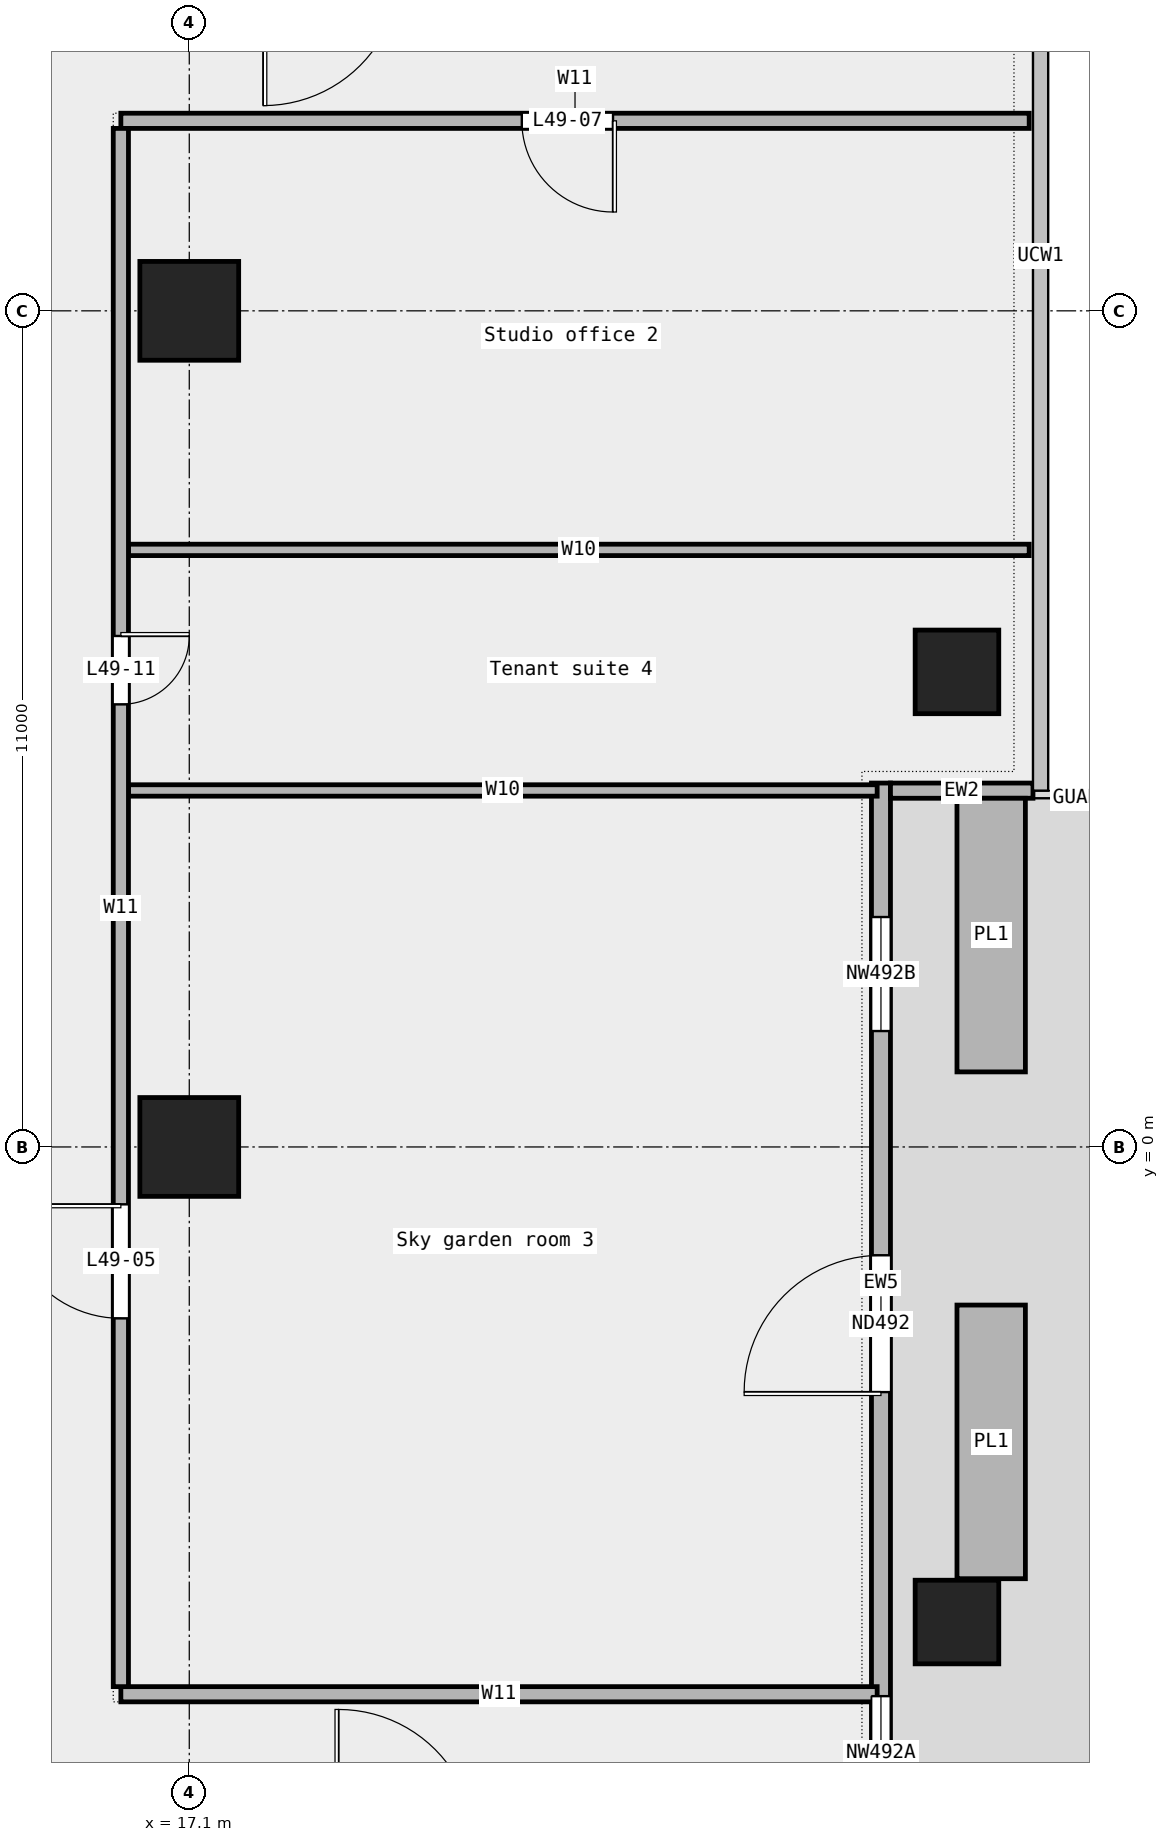
"""IFC4 building model, lengths in metres.
Left out: names, types, materials, properties, quantities, classifications, styles, units other than length and angle.
Written with IfcOpenShell. Run it as: python <this file> out.ifc"""

import sys

from ifc_helpers import new_model, si_unit, direction, frame, frame_2d, origin, origin_2d, place, context, subcontext, project, spatial, rectangle, extrude, element, fill, save


model = new_model("IFC4")
c1 = context("Model", 3, precision=1e-05, world=origin(), true_north=direction((0.0, 1.0)))
c2 = subcontext(c1, "Body", "Model", "MODEL_VIEW")
j1 = project(units=[si_unit("LENGTHUNIT", "METRE"), si_unit("PLANEANGLEUNIT", "RADIAN")], contexts=[c1])
p1 = place(None, origin())
s1 = spatial("IfcSite", under=j1, at=p1, CompositionType="ELEMENT")
p2 = place(p1, origin())
s2 = spatial("IfcBuilding", under=s1, at=p2, CompositionType="ELEMENT")
p3 = place(p2, frame((0.0, 0.0, 231.0)))
s3 = spatial("IfcBuildingStorey", under=s2, at=p3, CompositionType="ELEMENT", Elevation=231.0)
for number, where, z_axis, x_axis in (
    (1, (27.2, -6.25, 0.0), (0.0, 0.0, 1.0), (1.0, 0.0, 0.0)),
    (2, (27.2, 6.25, 0.0), (0.0, 0.0, 1.0), (1.0, 0.0, 0.0)),
):
    element("IfcColumn", number, at=place(p3, frame(where, z_axis=z_axis, x_axis=x_axis)), inside=s3, PredefinedType="COLUMN", context=c2, shape_type="SweptSolid", body=[
        extrude(rectangle(XDim=1.1, YDim=1.1, at=origin_2d()), origin(), (0.0, 0.0, 1.0), 3.6),
    ])
for number, where, z_axis, x_axis in (
    (3, (17.1, 0.0, 0.0), (0.0, 0.0, 1.0), (1.0, 0.0, 0.0)),
    (4, (17.1, 11.0, 0.0), (0.0, 0.0, 1.0), (1.0, 0.0, 0.0)),
):
    element("IfcColumn", number, at=place(p3, frame(where, z_axis=z_axis, x_axis=x_axis)), inside=s3, PredefinedType="COLUMN", context=c2, shape_type="SweptSolid", body=[
        extrude(rectangle(XDim=1.3, YDim=1.3, at=origin_2d()), origin(), (0.0, 0.0, 1.0), 3.6),
    ])
p4 = place(p3, frame((26.2, -9.475, 0.0), z_axis=(0.0, 0.0, 1.0), x_axis=(0.0, 1.0, 0.0)))
e5 = element("IfcWall", 5, at=p4, inside=s3, PredefinedType="STANDARD", context=c2, shape_type="SweptSolid", body=[
    extrude(rectangle(XDim=14.263, YDim=0.25, at=frame_2d((7.131, 0.0))), origin(), (0.0, 0.0, 1.0), 3.6),
])
p5 = place(p4, frame((0.75, 0.0, 0.45)))
e6 = element("IfcOpeningElement", 6, at=p5, cuts=e5, PredefinedType="OPENING", context=c2, shape_type="SweptSolid", body=[
    extrude(rectangle(XDim=1.5, YDim=2.4, at=frame_2d((0.75, 1.2))), frame((0.0, 0.137, 0.0), z_axis=(0.0, -1.0, 0.0), x_axis=(1.0, 0.0, 0.0)), (0.0, 0.0, 1.0), 0.274),
])
p6 = place(p4, frame((6.25, 0.0, 0.0)))
e7 = element("IfcOpeningElement", 7, at=p6, cuts=e5, PredefinedType="OPENING", context=c2, shape_type="SweptSolid", body=[
    extrude(rectangle(XDim=1.8, YDim=2.4, at=frame_2d((0.9, 1.2))), frame((0.0, 0.137, 0.0), z_axis=(0.0, -1.0, 0.0), x_axis=(1.0, 0.0, 0.0)), (0.0, 0.0, 1.0), 0.274),
])
p7 = place(p4, frame((11.0, 0.0, 0.45)))
e8 = element("IfcOpeningElement", 8, at=p7, cuts=e5, PredefinedType="OPENING", context=c2, shape_type="SweptSolid", body=[
    extrude(rectangle(XDim=1.5, YDim=2.4, at=frame_2d((0.75, 1.2))), frame((0.0, 0.137, 0.0), z_axis=(0.0, -1.0, 0.0), x_axis=(1.0, 0.0, 0.0)), (0.0, 0.0, 1.0), 0.274),
])
p8 = place(p3, frame((28.2, 4.688, 0.0), z_axis=(0.0, 0.0, 1.0), x_axis=(-1.0, 0.0, 0.0)))
e9 = element("IfcWall", 9, at=p8, inside=s3, PredefinedType="STANDARD", context=c2, shape_type="SweptSolid", body=[
    extrude(rectangle(XDim=1.875, YDim=0.2, at=frame_2d((0.938, 0.0))), origin(), (0.0, 0.0, 1.0), 3.6),
])
for number, where, z_axis, x_axis in (
    (10, (27.65, -5.68, 0.0), (0.0, 0.0, 1.0), (0.0, 1.0, 0.0)),
    (11, (27.65, 0.988, 0.0), (0.0, 0.0, 1.0), (0.0, 1.0, 0.0)),
):
    element("IfcWall", number, at=place(p3, frame(where, z_axis=z_axis, x_axis=x_axis)), inside=s3, PredefinedType="STANDARD", context=c2, shape_type="SweptSolid", body=[
        extrude(rectangle(XDim=3.6, YDim=0.9, at=frame_2d((1.8, 0.0))), origin(), (0.0, 0.0, 1.0), 0.7),
    ])
p9 = place(p3, frame((16.2, -7.2, 0.0), z_axis=(0.0, 0.0, 1.0), x_axis=(1.0, 0.0, 0.0)))
e12 = element("IfcWall", 12, at=p9, inside=s3, PredefinedType="PARTITIONING", context=c2, shape_type="SweptSolid", body=[
    extrude(rectangle(XDim=9.95, YDim=0.2, at=frame_2d((4.975, 0.0))), origin(), (0.0, 0.0, 1.0), 3.6),
])
p10 = place(p3, frame((16.3, 4.69, 0.0), z_axis=(0.0, 0.0, 1.0), x_axis=(1.0, 0.0, 0.0)))
e13 = element("IfcWall", 13, at=p10, inside=s3, PredefinedType="PARTITIONING", context=c2, shape_type="SweptSolid", body=[
    extrude(rectangle(XDim=9.85, YDim=0.15, at=frame_2d((4.925, 0.0))), origin(), (0.0, 0.0, 1.0), 3.6),
])
p11 = place(p3, frame((16.3, 7.855, 0.0), z_axis=(0.0, 0.0, 1.0), x_axis=(1.0, 0.0, 0.0)))
e14 = element("IfcWall", 14, at=p11, inside=s3, PredefinedType="PARTITIONING", context=c2, shape_type="SweptSolid", body=[
    extrude(rectangle(XDim=11.85, YDim=0.15, at=frame_2d((5.925, 0.0))), origin(), (0.0, 0.0, 1.0), 3.6),
])
p12 = place(p3, frame((16.2, 13.5, 0.0), z_axis=(0.0, 0.0, 1.0), x_axis=(1.0, 0.0, 0.0)))
e15 = element("IfcWall", 15, at=p12, inside=s3, PredefinedType="PARTITIONING", context=c2, shape_type="SweptSolid", body=[
    extrude(rectangle(XDim=11.95, YDim=0.2, at=frame_2d((5.975, 0.0))), origin(), (0.0, 0.0, 1.0), 3.6),
])
p13 = place(p12, frame((5.275, 0.0, 0.0)))
e16 = element("IfcOpeningElement", 16, at=p13, cuts=e15, PredefinedType="OPENING", context=c2, shape_type="SweptSolid", body=[
    extrude(rectangle(XDim=1.2, YDim=2.1, at=frame_2d((0.6, 1.05))), frame((0.0, 0.112, 0.0), z_axis=(0.0, -1.0, 0.0), x_axis=(1.0, 0.0, 0.0)), (0.0, 0.0, 1.0), 0.224),
])
p14 = place(p3, frame((16.2, -7.1, 0.0), z_axis=(0.0, 0.0, 1.0), x_axis=(0.0, 1.0, 0.0)))
e17 = element("IfcWall", 17, at=p14, inside=s3, PredefinedType="PARTITIONING", context=c2, shape_type="SweptSolid", body=[
    extrude(rectangle(XDim=20.5, YDim=0.2, at=frame_2d((10.25, 0.0))), origin(), (0.0, 0.0, 1.0), 3.6),
])
p15 = place(p14, frame((4.845, 0.0, 0.0)))
e18 = element("IfcOpeningElement", 18, at=p15, cuts=e17, PredefinedType="OPENING", context=c2, shape_type="SweptSolid", body=[
    extrude(rectangle(XDim=1.5, YDim=2.1, at=frame_2d((0.75, 1.05))), frame((0.0, 0.112, 0.0), z_axis=(0.0, -1.0, 0.0), x_axis=(1.0, 0.0, 0.0)), (0.0, 0.0, 1.0), 0.224),
])
p16 = place(p14, frame((12.923, 0.0, 0.0)))
e19 = element("IfcOpeningElement", 19, at=p16, cuts=e17, PredefinedType="OPENING", context=c2, shape_type="SweptSolid", body=[
    extrude(rectangle(XDim=0.9, YDim=2.1, at=frame_2d((0.45, 1.05))), frame((0.0, 0.112, 0.0), z_axis=(0.0, -1.0, 0.0), x_axis=(1.0, 0.0, 0.0)), (0.0, 0.0, 1.0), 0.224),
])
p17 = place(p5, origin())
e20 = element("IfcWindow", 20, at=p17, inside=s3, PartitioningType="SINGLE_PANEL", PredefinedType="WINDOW", context=c2, shape_type="SweptSolid", body=[
    extrude(rectangle(XDim=1.5, YDim=2.4, at=frame_2d((0.75, 1.2))), frame((0.0, 0.03, 0.0), z_axis=(0.0, -1.0, 0.0), x_axis=(1.0, 0.0, 0.0)), (0.0, 0.0, 1.0), 0.06),
])
fill(e6, e20)
p18 = place(p6, origin())
e21 = element("IfcDoor", 21, at=p18, inside=s3, OperationType="DOUBLE_DOOR_SINGLE_SWING", PredefinedType="DOOR", context=c2, shape_type="SweptSolid", body=[
    extrude(rectangle(XDim=1.8, YDim=2.4, at=frame_2d((0.9, 1.2))), frame((0.0, 0.025, 0.0), z_axis=(0.0, -1.0, 0.0), x_axis=(1.0, 0.0, 0.0)), (0.0, 0.0, 1.0), 0.05),
])
fill(e7, e21)
p19 = place(p7, origin())
e22 = element("IfcWindow", 22, at=p19, inside=s3, PartitioningType="SINGLE_PANEL", PredefinedType="WINDOW", context=c2, shape_type="SweptSolid", body=[
    extrude(rectangle(XDim=1.5, YDim=2.4, at=frame_2d((0.75, 1.2))), frame((0.0, 0.03, 0.0), z_axis=(0.0, -1.0, 0.0), x_axis=(1.0, 0.0, 0.0)), (0.0, 0.0, 1.0), 0.06),
])
fill(e8, e22)
p20 = place(p15, origin())
e23 = element("IfcDoor", 23, at=p20, inside=s3, OperationType="DOUBLE_DOOR_SINGLE_SWING", PredefinedType="DOOR", context=c2, shape_type="SweptSolid", body=[
    extrude(rectangle(XDim=1.5, YDim=2.1, at=frame_2d((0.75, 1.05))), frame((0.0, 0.025, 0.0), z_axis=(0.0, -1.0, 0.0), x_axis=(1.0, 0.0, 0.0)), (0.0, 0.0, 1.0), 0.05),
])
fill(e18, e23)
p21 = place(p13, origin())
e24 = element("IfcDoor", 24, at=p21, inside=s3, OperationType="SINGLE_SWING_LEFT", PredefinedType="DOOR", context=c2, shape_type="SweptSolid", body=[
    extrude(rectangle(XDim=1.2, YDim=2.1, at=frame_2d((0.6, 1.05))), frame((0.0, 0.025, 0.0), z_axis=(0.0, -1.0, 0.0), x_axis=(1.0, 0.0, 0.0)), (0.0, 0.0, 1.0), 0.05),
])
fill(e16, e24)
p22 = place(p16, origin())
e25 = element("IfcDoor", 25, at=p22, inside=s3, OperationType="SINGLE_SWING_LEFT", PredefinedType="DOOR", context=c2, shape_type="SweptSolid", body=[
    extrude(rectangle(XDim=0.9, YDim=2.1, at=frame_2d((0.45, 1.05))), frame((0.0, 0.025, 0.0), z_axis=(0.0, -1.0, 0.0), x_axis=(1.0, 0.0, 0.0)), (0.0, 0.0, 1.0), 0.05),
])
fill(e19, e25)
save(model, sys.argv[1])
